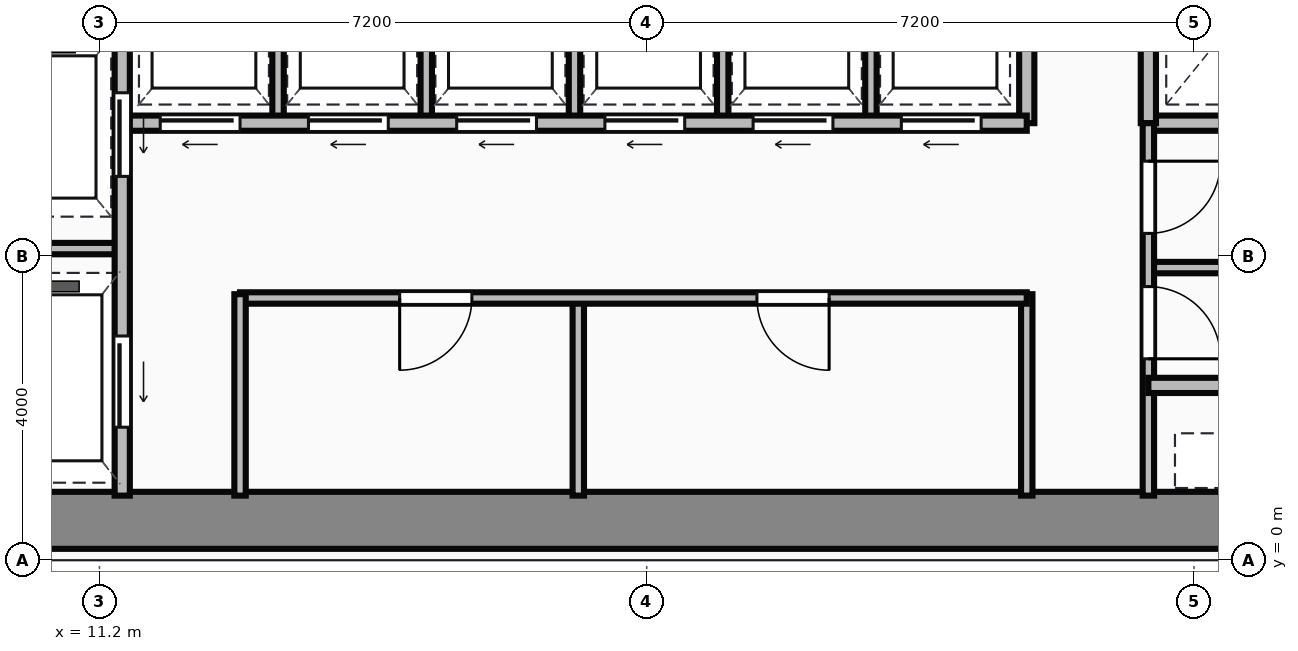
"""IFC4 building model, lengths in metres.
Left out: names, types, materials, properties, quantities, classifications, styles, units other than length and angle.
Written with IfcOpenShell. Run it as: python <this file> out.ifc"""

import sys

from ifc_helpers import new_model, si_unit, direction, frame, frame_2d, origin, place, context, subcontext, project, spatial, rectangle, extrude, source, transform, mapped, element, fill, save


model = new_model("IFC4")
c1 = context("Model", 3, precision=1e-05, world=origin(), true_north=direction((0.0, 1.0)))
c2 = subcontext(c1, "Body", "Model", "MODEL_VIEW")
j1 = project(units=[si_unit("LENGTHUNIT", "METRE"), si_unit("PLANEANGLEUNIT", "RADIAN")], contexts=[c1])
p1 = place(None, origin())
s1 = spatial("IfcSite", under=j1, at=p1, CompositionType="ELEMENT")
p2 = place(p1, origin())
s2 = spatial("IfcBuilding", under=s1, at=p2, CompositionType="ELEMENT")
p3 = place(p2, frame((0.0, 0.0, 144.25)))
s3 = spatial("IfcBuildingStorey", under=s2, at=p3, CompositionType="ELEMENT", Elevation=144.25)
m1 = source(origin(), c2, "Body", "SweptSolid", [
    extrude(rectangle(XDim=29.5, YDim=0.75, at=frame_2d((14.75, 0.0))), origin(), (0.0, 0.0, 1.0), 3.65),
])
p4 = place(p3, frame((4.5, 0.525, 0.0), z_axis=(0.0, 0.0, 1.0), x_axis=(1.0, 0.0, 0.0)))
e1 = element("IfcWall", 1, at=p4, inside=s3, PredefinedType="SHEAR", context=c2, shape_type="MappedRepresentation", body=[
    mapped(m1, transform((0.0, 0.0, 0.0))),
])
m2 = source(origin(), c2, "Body", "SweptSolid", [
    extrude(rectangle(XDim=9.6, YDim=0.2, at=frame_2d((4.8, 0.0))), origin(), (0.0, 0.0, 1.0), 3.4),
])
p5 = place(p3, frame((11.5, 0.85, 0.0), z_axis=(0.0, 0.0, 1.0), x_axis=(0.0, 1.0, 0.0)))
e2 = element("IfcWall", 2, at=p5, inside=s3, PredefinedType="PARTITIONING", context=c2, shape_type="MappedRepresentation", body=[
    mapped(m2, transform((0.0, 0.0, 0.0))),
])
p6 = place(p5, frame((4.2, 0.0, 0.0)))
e3 = element("IfcOpeningElement", 3, at=p6, cuts=e2, PredefinedType="OPENING", context=c2, shape_type="SweptSolid", body=[
    extrude(rectangle(XDim=1.1, YDim=2.15, at=frame_2d((0.55, 1.075))), frame((0.0, 0.11, 0.0), z_axis=(0.0, -1.0, 0.0), x_axis=(1.0, 0.0, 0.0)), (0.0, 0.0, 1.0), 0.22),
])
p7 = place(p5, frame((0.9, 0.0, 0.0)))
e4 = element("IfcOpeningElement", 4, at=p7, cuts=e2, PredefinedType="OPENING", context=c2, shape_type="SweptSolid", body=[
    extrude(rectangle(XDim=1.2, YDim=2.15, at=frame_2d((0.6, 1.075))), frame((0.0, 0.11, 0.0), z_axis=(0.0, -1.0, 0.0), x_axis=(1.0, 0.0, 0.0)), (0.0, 0.0, 1.0), 0.22),
])
m3 = source(origin(), c2, "Body", "SweptSolid", [
    extrude(rectangle(XDim=2.4, YDim=0.15, at=frame_2d((1.2, 0.0))), origin(), (0.0, 0.0, 1.0), 3.4),
])
p8 = place(p3, frame((9.1, 4.1, 0.0), z_axis=(0.0, 0.0, 1.0), x_axis=(1.0, 0.0, 0.0)))
e5 = element("IfcWall", 5, at=p8, inside=s3, PredefinedType="PARTITIONING", context=c2, shape_type="MappedRepresentation", body=[
    mapped(m3, transform((0.0, 0.0, 0.0))),
])
m4 = source(origin(), c2, "Body", "SweptSolid", [
    extrude(rectangle(XDim=2.65, YDim=0.15, at=frame_2d((1.325, 0.0))), origin(), (0.0, 0.0, 1.0), 3.4),
])
p9 = place(p3, frame((13.05, 0.85, 0.0), z_axis=(0.0, 0.0, 1.0), x_axis=(0.0, 1.0, 0.0)))
e6 = element("IfcWall", 6, at=p9, inside=s3, PredefinedType="PARTITIONING", context=c2, shape_type="MappedRepresentation", body=[
    mapped(m4, transform((0.0, 0.0, 0.0))),
])
m5 = source(origin(), c2, "Body", "SweptSolid", [
    extrude(rectangle(XDim=10.35, YDim=0.15, at=frame_2d((5.175, 0.0))), origin(), (0.0, 0.0, 1.0), 3.4),
])
p10 = place(p3, frame((13.05, 3.45, 0.0), z_axis=(0.0, 0.0, 1.0), x_axis=(1.0, 0.0, 0.0)))
e7 = element("IfcWall", 7, at=p10, inside=s3, PredefinedType="PARTITIONING", context=c2, shape_type="MappedRepresentation", body=[
    mapped(m5, transform((0.0, 0.0, 0.0))),
])
p11 = place(p10, frame((2.1, 0.0, 0.0)))
e8 = element("IfcOpeningElement", 8, at=p11, cuts=e7, PredefinedType="OPENING", context=c2, shape_type="SweptSolid", body=[
    extrude(rectangle(XDim=0.95, YDim=2.15, at=frame_2d((0.475, 1.075))), frame((0.0, 0.085, 0.0), z_axis=(0.0, -1.0, 0.0), x_axis=(1.0, 0.0, 0.0)), (0.0, 0.0, 1.0), 0.17),
])
p12 = place(p10, frame((6.8, 0.0, 0.0)))
e9 = element("IfcOpeningElement", 9, at=p12, cuts=e7, PredefinedType="OPENING", context=c2, shape_type="SweptSolid", body=[
    extrude(rectangle(XDim=0.95, YDim=2.15, at=frame_2d((0.475, 1.075))), frame((0.0, 0.085, 0.0), z_axis=(0.0, -1.0, 0.0), x_axis=(1.0, 0.0, 0.0)), (0.0, 0.0, 1.0), 0.17),
])
p13 = place(p3, frame((23.4, 0.85, 0.0), z_axis=(0.0, 0.0, 1.0), x_axis=(0.0, 1.0, 0.0)))
e10 = element("IfcWall", 10, at=p13, inside=s3, PredefinedType="PARTITIONING", context=c2, shape_type="MappedRepresentation", body=[
    mapped(m4, transform((0.0, 0.0, 0.0))),
])
m6 = source(origin(), c2, "Body", "SweptSolid", [
    extrude(rectangle(XDim=2.6, YDim=0.15, at=frame_2d((1.3, 0.0))), origin(), (0.0, 0.0, 1.0), 3.4),
])
p14 = place(p3, frame((17.5, 0.85, 0.0), z_axis=(0.0, 0.0, 1.0), x_axis=(0.0, 1.0, 0.0)))
e11 = element("IfcWall", 11, at=p14, inside=s3, PredefinedType="PARTITIONING", context=c2, shape_type="MappedRepresentation", body=[
    mapped(m6, transform((0.0, 0.0, 0.0))),
])
m7 = source(origin(), c2, "Body", "SweptSolid", [
    extrude(rectangle(XDim=11.85, YDim=0.2, at=frame_2d((5.925, 0.0))), origin(), (0.0, 0.0, 1.0), 3.4),
])
p15 = place(p3, frame((11.55, 5.75, 0.0), z_axis=(0.0, 0.0, 1.0), x_axis=(1.0, 0.0, 0.0)))
e12 = element("IfcWall", 12, at=p15, inside=s3, PredefinedType="PARTITIONING", context=c2, shape_type="MappedRepresentation", body=[
    mapped(m7, transform((0.0, 0.0, 0.0))),
])
p16 = place(p15, frame((0.45, 0.0, 0.0)))
e13 = element("IfcOpeningElement", 13, at=p16, cuts=e12, PredefinedType="OPENING", context=c2, shape_type="SweptSolid", body=[
    extrude(rectangle(XDim=1.05, YDim=2.15, at=frame_2d((0.525, 1.075))), frame((0.0, 0.11, 0.0), z_axis=(0.0, -1.0, 0.0), x_axis=(1.0, 0.0, 0.0)), (0.0, 0.0, 1.0), 0.22),
])
p17 = place(p15, frame((2.4, 0.0, 0.0)))
e14 = element("IfcOpeningElement", 14, at=p17, cuts=e12, PredefinedType="OPENING", context=c2, shape_type="SweptSolid", body=[
    extrude(rectangle(XDim=1.05, YDim=2.15, at=frame_2d((0.525, 1.075))), frame((0.0, 0.11, 0.0), z_axis=(0.0, -1.0, 0.0), x_axis=(1.0, 0.0, 0.0)), (0.0, 0.0, 1.0), 0.22),
])
p18 = place(p15, frame((4.35, 0.0, 0.0)))
e15 = element("IfcOpeningElement", 15, at=p18, cuts=e12, PredefinedType="OPENING", context=c2, shape_type="SweptSolid", body=[
    extrude(rectangle(XDim=1.05, YDim=2.15, at=frame_2d((0.525, 1.075))), frame((0.0, 0.11, 0.0), z_axis=(0.0, -1.0, 0.0), x_axis=(1.0, 0.0, 0.0)), (0.0, 0.0, 1.0), 0.22),
])
p19 = place(p15, frame((6.3, 0.0, 0.0)))
e16 = element("IfcOpeningElement", 16, at=p19, cuts=e12, PredefinedType="OPENING", context=c2, shape_type="SweptSolid", body=[
    extrude(rectangle(XDim=1.05, YDim=2.15, at=frame_2d((0.525, 1.075))), frame((0.0, 0.11, 0.0), z_axis=(0.0, -1.0, 0.0), x_axis=(1.0, 0.0, 0.0)), (0.0, 0.0, 1.0), 0.22),
])
p20 = place(p15, frame((8.25, 0.0, 0.0)))
e17 = element("IfcOpeningElement", 17, at=p20, cuts=e12, PredefinedType="OPENING", context=c2, shape_type="SweptSolid", body=[
    extrude(rectangle(XDim=1.05, YDim=2.15, at=frame_2d((0.525, 1.075))), frame((0.0, 0.11, 0.0), z_axis=(0.0, -1.0, 0.0), x_axis=(1.0, 0.0, 0.0)), (0.0, 0.0, 1.0), 0.22),
])
p21 = place(p15, frame((10.2, 0.0, 0.0)))
e18 = element("IfcOpeningElement", 18, at=p21, cuts=e12, PredefinedType="OPENING", context=c2, shape_type="SweptSolid", body=[
    extrude(rectangle(XDim=1.05, YDim=2.15, at=frame_2d((0.525, 1.075))), frame((0.0, 0.11, 0.0), z_axis=(0.0, -1.0, 0.0), x_axis=(1.0, 0.0, 0.0)), (0.0, 0.0, 1.0), 0.22),
])
m8 = source(origin(), c2, "Body", "SweptSolid", [
    extrude(rectangle(XDim=2.6, YDim=0.2, at=frame_2d((1.3, 0.0))), origin(), (0.0, 0.0, 1.0), 3.4),
])
p22 = place(p3, frame((23.4, 5.75, 0.0), z_axis=(0.0, 0.0, 1.0), x_axis=(0.0, 1.0, 0.0)))
e19 = element("IfcWall", 19, at=p22, inside=s3, PredefinedType="PARTITIONING", context=c2, shape_type="MappedRepresentation", body=[
    mapped(m8, transform((0.0, 0.0, 0.0))),
])
m9 = source(origin(), c2, "Body", "SweptSolid", [
    extrude(rectangle(XDim=2.5, YDim=0.15, at=frame_2d((1.25, 0.0))), origin(), (0.0, 0.0, 1.0), 3.4),
])
for number, where, z_axis, x_axis in (
    (20, (13.55, 5.8, 0.0), (0.0, 0.0, 1.0), (0.0, 1.0, 0.0)),
    (21, (15.5, 5.8, 0.0), (0.0, 0.0, 1.0), (0.0, 1.0, 0.0)),
    (22, (17.45, 5.8, 0.0), (0.0, 0.0, 1.0), (0.0, 1.0, 0.0)),
    (23, (19.4, 5.8, 0.0), (0.0, 0.0, 1.0), (0.0, 1.0, 0.0)),
    (24, (21.35, 5.8, 0.0), (0.0, 0.0, 1.0), (0.0, 1.0, 0.0)),
):
    element("IfcWall", number, at=place(p3, frame(where, z_axis=z_axis, x_axis=x_axis)), inside=s3, PredefinedType="PARTITIONING", context=c2, shape_type="MappedRepresentation", body=[
        mapped(m9, transform((0.0, 0.0, 0.0))),
    ])
m10 = source(origin(), c2, "Body", "SweptSolid", [
    extrude(rectangle(XDim=4.55, YDim=0.2, at=frame_2d((2.275, 0.0))), origin(), (0.0, 0.0, 1.0), 3.4),
])
p23 = place(p3, frame((25.0, 5.75, 0.0), z_axis=(0.0, 0.0, 1.0), x_axis=(1.0, 0.0, 0.0)))
e25 = element("IfcWall", 25, at=p23, inside=s3, PredefinedType="PARTITIONING", context=c2, shape_type="MappedRepresentation", body=[
    mapped(m10, transform((0.0, 0.0, 0.0))),
])
p24 = place(p3, frame((25.0, 5.75, 0.0), z_axis=(0.0, 0.0, 1.0), x_axis=(0.0, 1.0, 0.0)))
e26 = element("IfcWall", 26, at=p24, inside=s3, PredefinedType="PARTITIONING", context=c2, shape_type="MappedRepresentation", body=[
    mapped(m8, transform((0.0, 0.0, 0.0))),
])
m11 = source(origin(), c2, "Body", "SweptSolid", [
    extrude(rectangle(XDim=4.9, YDim=0.15, at=frame_2d((2.45, 0.0))), origin(), (0.0, 0.0, 1.0), 3.4),
])
p25 = place(p3, frame((25.0, 0.85, 0.0), z_axis=(0.0, 0.0, 1.0), x_axis=(0.0, 1.0, 0.0)))
e27 = element("IfcWall", 27, at=p25, inside=s3, PredefinedType="PARTITIONING", context=c2, shape_type="MappedRepresentation", body=[
    mapped(m11, transform((0.0, 0.0, 0.0))),
])
p26 = place(p25, frame((1.8, 0.0, 0.0)))
e28 = element("IfcOpeningElement", 28, at=p26, cuts=e27, PredefinedType="OPENING", context=c2, shape_type="SweptSolid", body=[
    extrude(rectangle(XDim=0.95, YDim=2.15, at=frame_2d((0.475, 1.075))), frame((0.0, 0.085, 0.0), z_axis=(0.0, -1.0, 0.0), x_axis=(1.0, 0.0, 0.0)), (0.0, 0.0, 1.0), 0.17),
])
p27 = place(p25, frame((3.45, 0.0, 0.0)))
e29 = element("IfcOpeningElement", 29, at=p27, cuts=e27, PredefinedType="OPENING", context=c2, shape_type="SweptSolid", body=[
    extrude(rectangle(XDim=0.95, YDim=2.15, at=frame_2d((0.475, 1.075))), frame((0.0, 0.085, 0.0), z_axis=(0.0, -1.0, 0.0), x_axis=(1.0, 0.0, 0.0)), (0.0, 0.0, 1.0), 0.17),
])
m12 = source(origin(), c2, "Body", "SweptSolid", [
    extrude(rectangle(XDim=2.4, YDim=0.2, at=frame_2d((1.2, 0.0))), origin(), (0.0, 0.0, 1.0), 3.4),
])
p28 = place(p3, frame((25.0, 2.3, 0.0), z_axis=(0.0, 0.0, 1.0), x_axis=(1.0, 0.0, 0.0)))
e30 = element("IfcWall", 30, at=p28, inside=s3, PredefinedType="PARTITIONING", context=c2, shape_type="MappedRepresentation", body=[
    mapped(m12, transform((0.0, 0.0, 0.0))),
])
m13 = source(origin(), c2, "Body", "SweptSolid", [
    extrude(rectangle(XDim=4.55, YDim=0.15, at=frame_2d((2.275, 0.0))), origin(), (0.0, 0.0, 1.0), 3.4),
])
p29 = place(p3, frame((25.0, 3.85, 0.0), z_axis=(0.0, 0.0, 1.0), x_axis=(1.0, 0.0, 0.0)))
e31 = element("IfcWall", 31, at=p29, inside=s3, PredefinedType="PARTITIONING", context=c2, shape_type="MappedRepresentation", body=[
    mapped(m13, transform((0.0, 0.0, 0.0))),
])
m14 = source(origin(), c2, "Body", "SweptSolid", [
    extrude(rectangle(XDim=1.1, YDim=2.15, at=frame_2d((0.55, 1.075))), frame((0.0, 0.025, 0.0), z_axis=(0.0, -1.0, 0.0), x_axis=(1.0, 0.0, 0.0)), (0.0, 0.0, 1.0), 0.05),
])
p30 = place(p6, frame((1.1, 0.0, 0.0), z_axis=(0.0, 0.0, 1.0), x_axis=(-1.0, 0.0, 0.0)))
e32 = element("IfcDoor", 32, at=p30, inside=s3, OperationType="SLIDING_TO_LEFT", PredefinedType="DOOR", context=c2, shape_type="MappedRepresentation", body=[
    mapped(m14, transform((0.0, 0.0, 0.0))),
])
fill(e3, e32)
m15 = source(origin(), c2, "Body", "SweptSolid", [
    extrude(rectangle(XDim=1.2, YDim=2.15, at=frame_2d((0.6, 1.075))), frame((0.0, 0.025, 0.0), z_axis=(0.0, -1.0, 0.0), x_axis=(1.0, 0.0, 0.0)), (0.0, 0.0, 1.0), 0.05),
])
p31 = place(p7, frame((1.2, 0.0, 0.0), z_axis=(0.0, 0.0, 1.0), x_axis=(-1.0, 0.0, 0.0)))
e33 = element("IfcDoor", 33, at=p31, inside=s3, OperationType="SLIDING_TO_LEFT", PredefinedType="DOOR", context=c2, shape_type="MappedRepresentation", body=[
    mapped(m15, transform((0.0, 0.0, 0.0))),
])
fill(e4, e33)
m16 = source(origin(), c2, "Body", "SweptSolid", [
    extrude(rectangle(XDim=0.95, YDim=2.15, at=frame_2d((0.475, 1.075))), frame((0.0, 0.025, 0.0), z_axis=(0.0, -1.0, 0.0), x_axis=(1.0, 0.0, 0.0)), (0.0, 0.0, 1.0), 0.05),
])
p32 = place(p11, origin())
e34 = element("IfcDoor", 34, at=p32, inside=s3, OperationType="SINGLE_SWING_LEFT", PredefinedType="DOOR", context=c2, shape_type="MappedRepresentation", body=[
    mapped(m16, transform((0.0, 0.0, 0.0))),
])
fill(e8, e34)
p33 = place(p12, origin())
e35 = element("IfcDoor", 35, at=p33, inside=s3, OperationType="SINGLE_SWING_RIGHT", PredefinedType="DOOR", context=c2, shape_type="MappedRepresentation", body=[
    mapped(m16, transform((0.0, 0.0, 0.0))),
])
fill(e9, e35)
m17 = source(origin(), c2, "Body", "SweptSolid", [
    extrude(rectangle(XDim=1.05, YDim=2.15, at=frame_2d((0.525, 1.075))), frame((0.0, 0.025, 0.0), z_axis=(0.0, -1.0, 0.0), x_axis=(1.0, 0.0, 0.0)), (0.0, 0.0, 1.0), 0.05),
])
p34 = place(p16, frame((1.05, 0.0, 0.0), z_axis=(0.0, 0.0, 1.0), x_axis=(-1.0, 0.0, 0.0)))
e36 = element("IfcDoor", 36, at=p34, inside=s3, OperationType="SLIDING_TO_LEFT", PredefinedType="DOOR", context=c2, shape_type="MappedRepresentation", body=[
    mapped(m17, transform((0.0, 0.0, 0.0))),
])
fill(e13, e36)
p35 = place(p17, frame((1.05, 0.0, 0.0), z_axis=(0.0, 0.0, 1.0), x_axis=(-1.0, 0.0, 0.0)))
e37 = element("IfcDoor", 37, at=p35, inside=s3, OperationType="SLIDING_TO_LEFT", PredefinedType="DOOR", context=c2, shape_type="MappedRepresentation", body=[
    mapped(m17, transform((0.0, 0.0, 0.0))),
])
fill(e14, e37)
p36 = place(p18, frame((1.05, 0.0, 0.0), z_axis=(0.0, 0.0, 1.0), x_axis=(-1.0, 0.0, 0.0)))
e38 = element("IfcDoor", 38, at=p36, inside=s3, OperationType="SLIDING_TO_LEFT", PredefinedType="DOOR", context=c2, shape_type="MappedRepresentation", body=[
    mapped(m17, transform((0.0, 0.0, 0.0))),
])
fill(e15, e38)
p37 = place(p19, frame((1.05, 0.0, 0.0), z_axis=(0.0, 0.0, 1.0), x_axis=(-1.0, 0.0, 0.0)))
e39 = element("IfcDoor", 39, at=p37, inside=s3, OperationType="SLIDING_TO_LEFT", PredefinedType="DOOR", context=c2, shape_type="MappedRepresentation", body=[
    mapped(m17, transform((0.0, 0.0, 0.0))),
])
fill(e16, e39)
p38 = place(p20, frame((1.05, 0.0, 0.0), z_axis=(0.0, 0.0, 1.0), x_axis=(-1.0, 0.0, 0.0)))
e40 = element("IfcDoor", 40, at=p38, inside=s3, OperationType="SLIDING_TO_LEFT", PredefinedType="DOOR", context=c2, shape_type="MappedRepresentation", body=[
    mapped(m17, transform((0.0, 0.0, 0.0))),
])
fill(e17, e40)
p39 = place(p21, frame((1.05, 0.0, 0.0), z_axis=(0.0, 0.0, 1.0), x_axis=(-1.0, 0.0, 0.0)))
e41 = element("IfcDoor", 41, at=p39, inside=s3, OperationType="SLIDING_TO_LEFT", PredefinedType="DOOR", context=c2, shape_type="MappedRepresentation", body=[
    mapped(m17, transform((0.0, 0.0, 0.0))),
])
fill(e18, e41)
p40 = place(p26, origin())
e42 = element("IfcDoor", 42, at=p40, inside=s3, OperationType="SINGLE_SWING_LEFT", PredefinedType="DOOR", context=c2, shape_type="MappedRepresentation", body=[
    mapped(m16, transform((0.0, 0.0, 0.0))),
])
fill(e28, e42)
p41 = place(p27, origin())
e43 = element("IfcDoor", 43, at=p41, inside=s3, OperationType="SINGLE_SWING_RIGHT", PredefinedType="DOOR", context=c2, shape_type="MappedRepresentation", body=[
    mapped(m16, transform((0.0, 0.0, 0.0))),
])
fill(e29, e43)
save(model, sys.argv[1])
